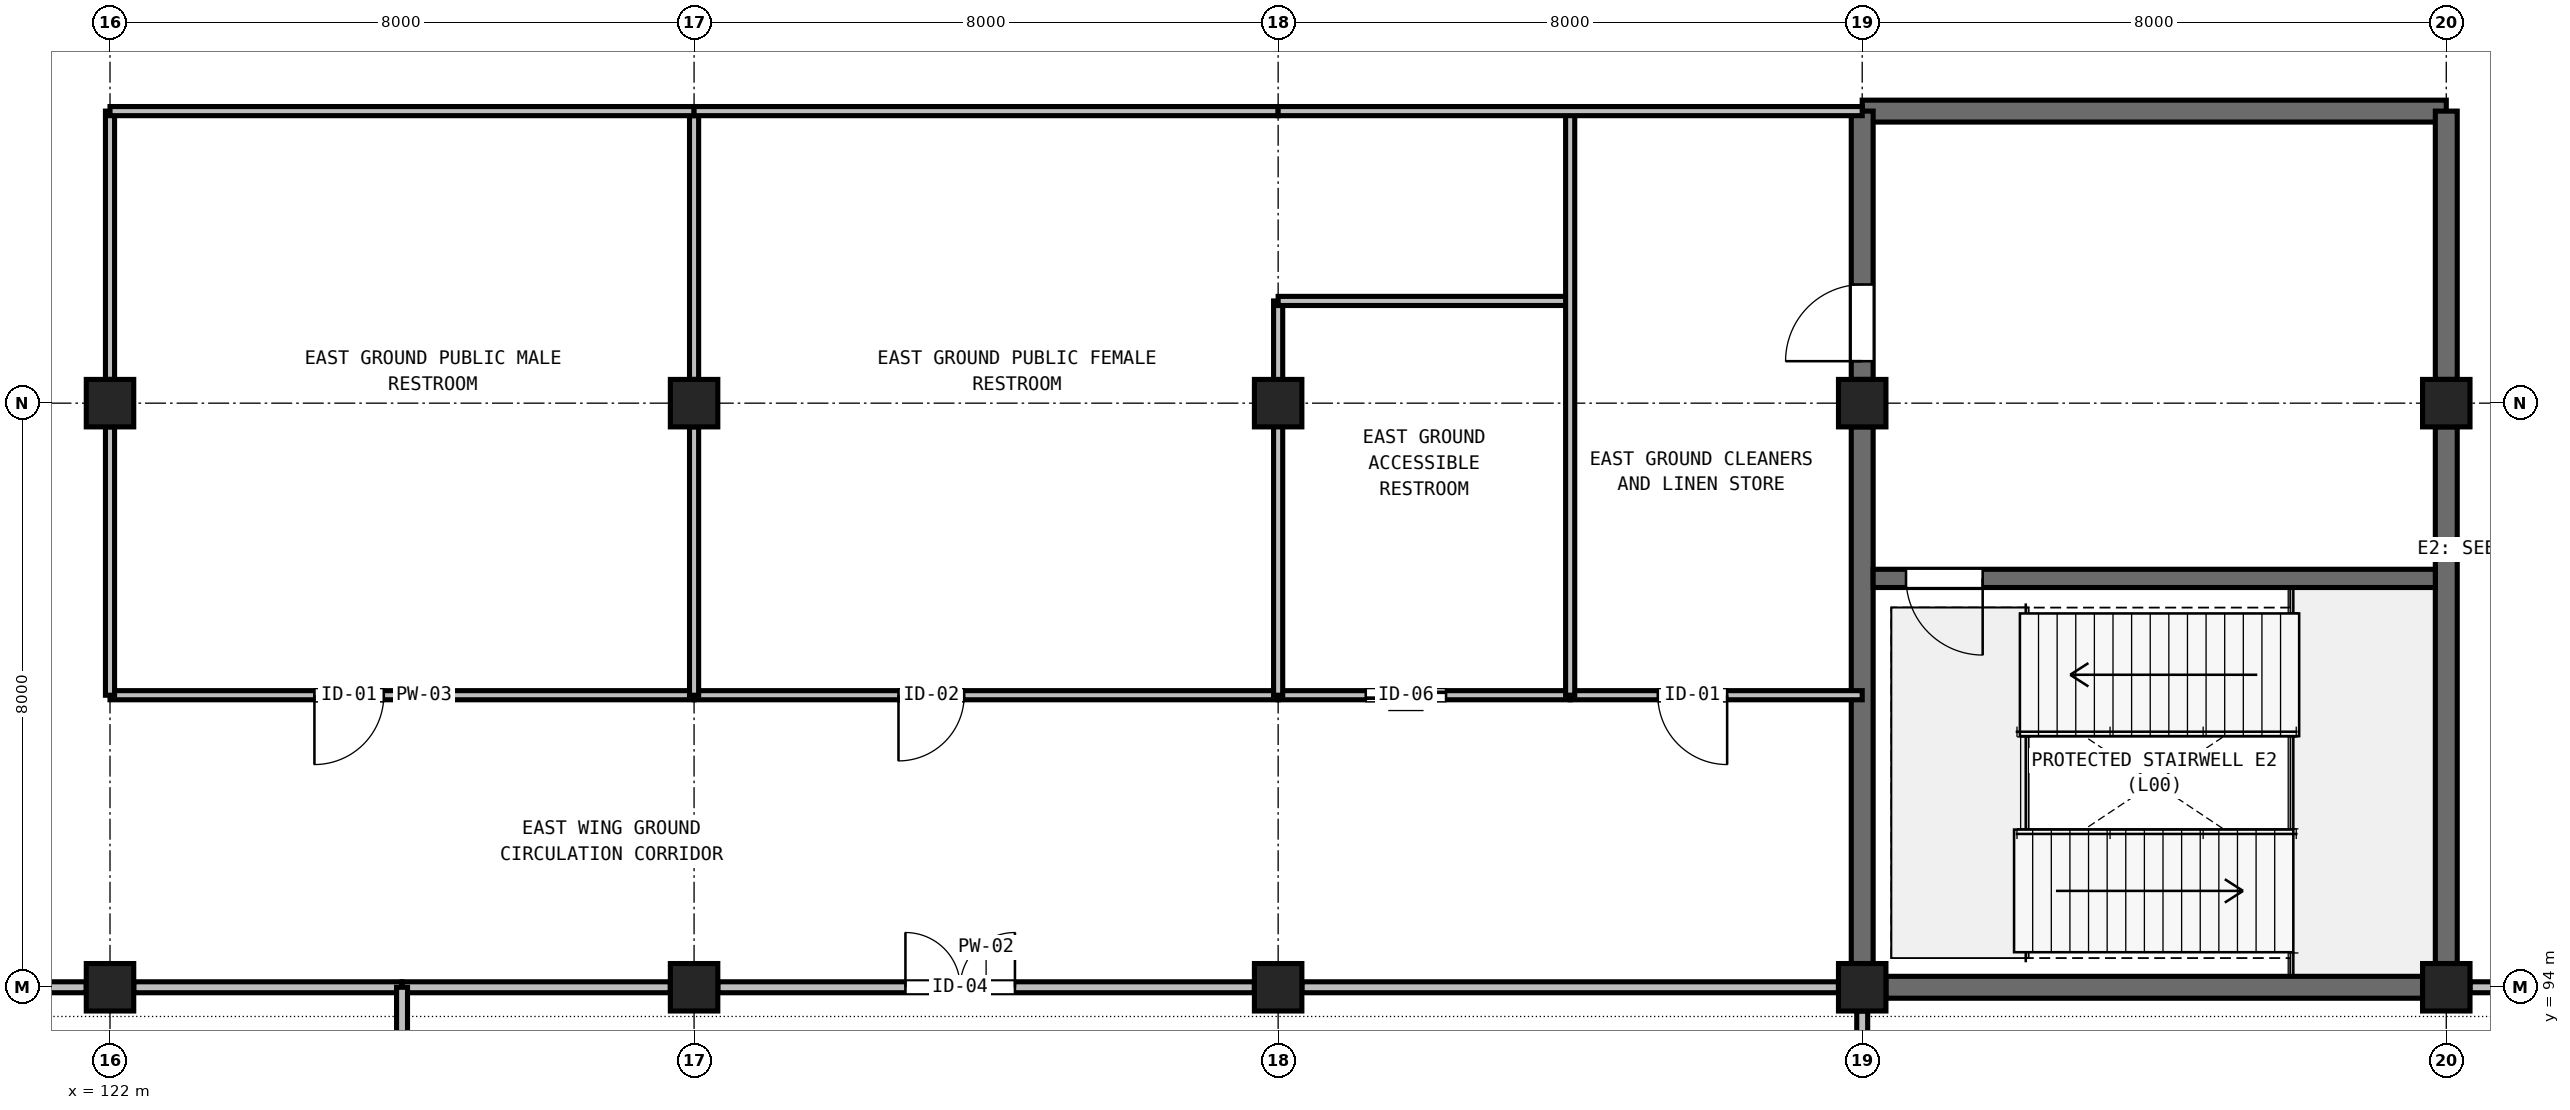
"""IFC4 building model, lengths in metres.
Left out: names, types, materials, properties, quantities, classifications, styles, units other than length and angle.
Written with IfcOpenShell. Run it as: python <this file> out.ifc"""

import sys

from ifc_helpers import new_model, si_unit, direction, frame, frame_2d, origin, origin_2d, place, context, subcontext, project, spatial, rectangle, circle, extrude, element, fill, save


model = new_model("IFC4")
c1 = context("Model", 3, precision=1e-05, world=origin(), true_north=direction((0.0, 1.0)))
c2 = subcontext(c1, "Body", "Model", "MODEL_VIEW")
j1 = project(units=[si_unit("LENGTHUNIT", "METRE"), si_unit("PLANEANGLEUNIT", "RADIAN")], contexts=[c1])
p1 = place(None, origin())
s1 = spatial("IfcSite", under=j1, at=p1, CompositionType="ELEMENT")
p2 = place(p1, origin())
s2 = spatial("IfcBuilding", under=s1, at=p2, CompositionType="ELEMENT")
p3 = place(p2, origin())
s3 = spatial("IfcBuildingStorey", under=s2, at=p3, CompositionType="ELEMENT", Elevation=0.0)
for number, where, z_axis, x_axis in (
    (1, (122.0, 94.0, 0.0), (0.0, 0.0, 1.0), (1.0, 0.0, 0.0)),
    (2, (122.0, 102.0, 0.0), (0.0, 0.0, 1.0), (1.0, 0.0, 0.0)),
    (3, (130.0, 94.0, 0.0), (0.0, 0.0, 1.0), (1.0, 0.0, 0.0)),
    (4, (130.0, 102.0, 0.0), (0.0, 0.0, 1.0), (1.0, 0.0, 0.0)),
    (5, (138.0, 94.0, 0.0), (0.0, 0.0, 1.0), (1.0, 0.0, 0.0)),
    (6, (138.0, 102.0, 0.0), (0.0, 0.0, 1.0), (1.0, 0.0, 0.0)),
    (7, (146.0, 94.0, 0.0), (0.0, 0.0, 1.0), (1.0, 0.0, 0.0)),
    (8, (146.0, 102.0, 0.0), (0.0, 0.0, 1.0), (1.0, 0.0, 0.0)),
    (9, (154.0, 94.0, 0.0), (0.0, 0.0, 1.0), (1.0, 0.0, 0.0)),
    (10, (154.0, 102.0, 0.0), (0.0, 0.0, 1.0), (1.0, 0.0, 0.0)),
):
    element("IfcColumn", number, at=place(p3, frame(where, z_axis=z_axis, x_axis=x_axis)), inside=s3, PredefinedType="COLUMN", context=c2, shape_type="SweptSolid", body=[
        extrude(circle(Radius=0.325, at=origin_2d()), origin(), (0.0, 0.0, 1.0), 5.4),
    ])
p4 = place(p3, frame((146.325, 94.0, 0.0), z_axis=(0.0, 0.0, 1.0), x_axis=(1.0, 0.0, 0.0)))
e11 = element("IfcWall", 11, at=p4, inside=s3, PredefinedType="SHEAR", context=c2, shape_type="SweptSolid", body=[
    extrude(rectangle(XDim=7.35, YDim=0.3, at=frame_2d((3.675, 0.0))), origin(), (0.0, 0.0, 1.0), 5.18),
])
p5 = place(p3, frame((146.0, 106.0, 0.0), z_axis=(0.0, 0.0, 1.0), x_axis=(1.0, 0.0, 0.0)))
e12 = element("IfcWall", 12, at=p5, inside=s3, PredefinedType="SHEAR", context=c2, shape_type="SweptSolid", body=[
    extrude(rectangle(XDim=8.0, YDim=0.3, at=frame_2d((4.0, 0.0))), origin(), (0.0, 0.0, 1.0), 5.18),
])
p6 = place(p3, frame((146.0, 94.325, 0.0), z_axis=(0.0, 0.0, 1.0), x_axis=(0.0, 1.0, 0.0)))
e13 = element("IfcWall", 13, at=p6, inside=s3, PredefinedType="SHEAR", context=c2, shape_type="SweptSolid", body=[
    extrude(rectangle(XDim=7.35, YDim=0.3, at=frame_2d((3.675, 0.0))), origin(), (0.0, 0.0, 1.0), 5.18),
])
p7 = place(p3, frame((146.0, 102.325, 0.0), z_axis=(0.0, 0.0, 1.0), x_axis=(0.0, 1.0, 0.0)))
e14 = element("IfcWall", 14, at=p7, inside=s3, PredefinedType="SHEAR", context=c2, shape_type="SweptSolid", body=[
    extrude(rectangle(XDim=3.675, YDim=0.3, at=frame_2d((1.837, 0.0))), origin(), (0.0, 0.0, 1.0), 5.18),
])
p8 = place(p7, frame((0.25, 0.0, 0.0)))
e15 = element("IfcOpeningElement", 15, at=p8, cuts=e14, PredefinedType="OPENING", context=c2, shape_type="SweptSolid", body=[
    extrude(rectangle(XDim=1.05, YDim=2.2, at=frame_2d((0.525, 1.1))), frame((0.0, 0.16, 0.0), z_axis=(0.0, -1.0, 0.0), x_axis=(1.0, 0.0, 0.0)), (0.0, 0.0, 1.0), 0.32),
])
p9 = place(p3, frame((154.0, 94.325, 0.0), z_axis=(0.0, 0.0, 1.0), x_axis=(0.0, 1.0, 0.0)))
e16 = element("IfcWall", 16, at=p9, inside=s3, PredefinedType="SHEAR", context=c2, shape_type="SweptSolid", body=[
    extrude(rectangle(XDim=7.35, YDim=0.3, at=frame_2d((3.675, 0.0))), origin(), (0.0, 0.0, 1.0), 5.18),
])
p10 = place(p3, frame((154.0, 102.325, 0.0), z_axis=(0.0, 0.0, 1.0), x_axis=(0.0, 1.0, 0.0)))
e17 = element("IfcWall", 17, at=p10, inside=s3, PredefinedType="SHEAR", context=c2, shape_type="SweptSolid", body=[
    extrude(rectangle(XDim=3.675, YDim=0.3, at=frame_2d((1.837, 0.0))), origin(), (0.0, 0.0, 1.0), 5.18),
])
p11 = place(p3, frame((146.15, 99.6, 0.0), z_axis=(0.0, 0.0, 1.0), x_axis=(1.0, 0.0, 0.0)))
e18 = element("IfcWall", 18, at=p11, inside=s3, PredefinedType="SOLIDWALL", context=c2, shape_type="SweptSolid", body=[
    extrude(rectangle(XDim=7.7, YDim=0.25, at=frame_2d((3.85, 0.0))), origin(), (0.0, 0.0, 1.0), 5.18),
])
p12 = place(p11, frame((0.45, 0.0, 0.0)))
e19 = element("IfcOpeningElement", 19, at=p12, cuts=e18, PredefinedType="OPENING", context=c2, shape_type="SweptSolid", body=[
    extrude(rectangle(XDim=1.05, YDim=2.2, at=frame_2d((0.525, 1.1))), frame((0.0, 0.135, 0.0), z_axis=(0.0, -1.0, 0.0), x_axis=(1.0, 0.0, 0.0)), (0.0, 0.0, 1.0), 0.27),
])
p13 = place(p3, frame((114.325, 94.0, 0.0), z_axis=(0.0, 0.0, 1.0), x_axis=(1.0, 0.0, 0.0)))
e20 = element("IfcWall", 20, at=p13, inside=s3, PredefinedType="PARTITIONING", context=c2, shape_type="SweptSolid", body=[
    extrude(rectangle(XDim=7.35, YDim=0.15, at=frame_2d((3.675, 0.0))), origin(), (0.0, 0.0, 1.0), 4.39),
])
p14 = place(p13, frame((2.57, 0.0, 0.0)))
e21 = element("IfcOpeningElement", 21, at=p14, cuts=e20, PredefinedType="OPENING", context=c2, shape_type="SweptSolid", body=[
    extrude(rectangle(XDim=1.5, YDim=2.2, at=frame_2d((0.75, 1.1))), frame((0.0, 0.085, 0.0), z_axis=(0.0, -1.0, 0.0), x_axis=(1.0, 0.0, 0.0)), (0.0, 0.0, 1.0), 0.17),
])
for number, where, z_axis, x_axis in (
    (22, (122.325, 94.0, 0.0), (0.0, 0.0, 1.0), (1.0, 0.0, 0.0)),
    (23, (126.0, 94.0, 0.0), (0.0, 0.0, 1.0), (1.0, 0.0, 0.0)),
):
    element("IfcWall", number, at=place(p3, frame(where, z_axis=z_axis, x_axis=x_axis)), inside=s3, PredefinedType="PARTITIONING", context=c2, shape_type="SweptSolid", body=[
        extrude(rectangle(XDim=3.675, YDim=0.15, at=frame_2d((1.837, 0.0))), origin(), (0.0, 0.0, 1.0), 4.24),
    ])
p15 = place(p3, frame((130.325, 94.0, 0.0), z_axis=(0.0, 0.0, 1.0), x_axis=(1.0, 0.0, 0.0)))
e24 = element("IfcWall", 24, at=p15, inside=s3, PredefinedType="PARTITIONING", context=c2, shape_type="SweptSolid", body=[
    extrude(rectangle(XDim=7.35, YDim=0.15, at=frame_2d((3.675, 0.0))), origin(), (0.0, 0.0, 1.0), 4.64),
])
p16 = place(p15, frame((2.57, 0.0, 0.0)))
e25 = element("IfcOpeningElement", 25, at=p16, cuts=e24, PredefinedType="OPENING", context=c2, shape_type="SweptSolid", body=[
    extrude(rectangle(XDim=1.5, YDim=2.2, at=frame_2d((0.75, 1.1))), frame((0.0, 0.085, 0.0), z_axis=(0.0, -1.0, 0.0), x_axis=(1.0, 0.0, 0.0)), (0.0, 0.0, 1.0), 0.17),
])
p17 = place(p3, frame((138.325, 94.0, 0.0), z_axis=(0.0, 0.0, 1.0), x_axis=(1.0, 0.0, 0.0)))
e26 = element("IfcWall", 26, at=p17, inside=s3, PredefinedType="PARTITIONING", context=c2, shape_type="SweptSolid", body=[
    extrude(rectangle(XDim=7.35, YDim=0.15, at=frame_2d((3.675, 0.0))), origin(), (0.0, 0.0, 1.0), 4.54),
])
p18 = place(p3, frame((154.325, 94.0, 0.0), z_axis=(0.0, 0.0, 1.0), x_axis=(1.0, 0.0, 0.0)))
e27 = element("IfcWall", 27, at=p18, inside=s3, PredefinedType="PARTITIONING", context=c2, shape_type="SweptSolid", body=[
    extrude(rectangle(XDim=7.35, YDim=0.15, at=frame_2d((3.675, 0.0))), origin(), (0.0, 0.0, 1.0), 4.34),
])
p19 = place(p3, frame((126.0, 86.0, 0.0), z_axis=(0.0, 0.0, 1.0), x_axis=(0.0, 1.0, 0.0)))
e28 = element("IfcWall", 28, at=p19, inside=s3, PredefinedType="PARTITIONING", context=c2, shape_type="SweptSolid", body=[
    extrude(rectangle(XDim=8.0, YDim=0.15, at=frame_2d((4.0, 0.0))), origin(), (0.0, 0.0, 1.0), 5.1),
])
p20 = place(p3, frame((146.0, 86.325, 0.0), z_axis=(0.0, 0.0, 1.0), x_axis=(0.0, 1.0, 0.0)))
e29 = element("IfcWall", 29, at=p20, inside=s3, PredefinedType="PARTITIONING", context=c2, shape_type="SweptSolid", body=[
    extrude(rectangle(XDim=7.35, YDim=0.15, at=frame_2d((3.675, 0.0))), origin(), (0.0, 0.0, 1.0), 4.29),
])
p21 = place(p20, frame((2.57, 0.0, 0.0)))
e30 = element("IfcOpeningElement", 30, at=p21, cuts=e29, PredefinedType="OPENING", context=c2, shape_type="SweptSolid", body=[
    extrude(rectangle(XDim=0.92, YDim=2.12, at=frame_2d((0.46, 1.06))), frame((0.0, 0.085, 0.0), z_axis=(0.0, -1.0, 0.0), x_axis=(1.0, 0.0, 0.0)), (0.0, 0.0, 1.0), 0.17),
])
p22 = place(p3, frame((122.0, 98.0, 0.0), z_axis=(0.0, 0.0, 1.0), x_axis=(1.0, 0.0, 0.0)))
e31 = element("IfcWall", 31, at=p22, inside=s3, PredefinedType="PARTITIONING", context=c2, shape_type="SweptSolid", body=[
    extrude(rectangle(XDim=8.0, YDim=0.125, at=frame_2d((4.0, 0.0))), origin(), (0.0, 0.0, 1.0), 5.1),
])
p23 = place(p22, frame((2.8, 0.0, 0.0)))
e32 = element("IfcOpeningElement", 32, at=p23, cuts=e31, PredefinedType="OPENING", context=c2, shape_type="SweptSolid", body=[
    extrude(rectangle(XDim=0.95, YDim=2.1, at=frame_2d((0.475, 1.05))), frame((0.0, 0.073, 0.0), z_axis=(0.0, -1.0, 0.0), x_axis=(1.0, 0.0, 0.0)), (0.0, 0.0, 1.0), 0.145),
])
p24 = place(p3, frame((130.0, 98.0, 0.0), z_axis=(0.0, 0.0, 1.0), x_axis=(1.0, 0.0, 0.0)))
e33 = element("IfcWall", 33, at=p24, inside=s3, PredefinedType="PARTITIONING", context=c2, shape_type="SweptSolid", body=[
    extrude(rectangle(XDim=8.0, YDim=0.125, at=frame_2d((4.0, 0.0))), origin(), (0.0, 0.0, 1.0), 5.1),
])
p25 = place(p24, frame((2.8, 0.0, 0.0)))
e34 = element("IfcOpeningElement", 34, at=p25, cuts=e33, PredefinedType="OPENING", context=c2, shape_type="SweptSolid", body=[
    extrude(rectangle(XDim=0.9, YDim=2.1, at=frame_2d((0.45, 1.05))), frame((0.0, 0.073, 0.0), z_axis=(0.0, -1.0, 0.0), x_axis=(1.0, 0.0, 0.0)), (0.0, 0.0, 1.0), 0.145),
])
p26 = place(p3, frame((138.0, 98.0, 0.0), z_axis=(0.0, 0.0, 1.0), x_axis=(1.0, 0.0, 0.0)))
e35 = element("IfcWall", 35, at=p26, inside=s3, PredefinedType="PARTITIONING", context=c2, shape_type="SweptSolid", body=[
    extrude(rectangle(XDim=4.0, YDim=0.125, at=frame_2d((2.0, 0.0))), origin(), (0.0, 0.0, 1.0), 5.1),
])
p27 = place(p26, frame((1.2, 0.0, 0.0)))
e36 = element("IfcOpeningElement", 36, at=p27, cuts=e35, PredefinedType="OPENING", context=c2, shape_type="SweptSolid", body=[
    extrude(rectangle(XDim=1.1, YDim=2.15, at=frame_2d((0.55, 1.075))), frame((0.0, 0.073, 0.0), z_axis=(0.0, -1.0, 0.0), x_axis=(1.0, 0.0, 0.0)), (0.0, 0.0, 1.0), 0.145),
])
p28 = place(p3, frame((142.0, 98.0, 0.0), z_axis=(0.0, 0.0, 1.0), x_axis=(1.0, 0.0, 0.0)))
e37 = element("IfcWall", 37, at=p28, inside=s3, PredefinedType="PARTITIONING", context=c2, shape_type="SweptSolid", body=[
    extrude(rectangle(XDim=4.0, YDim=0.125, at=frame_2d((2.0, 0.0))), origin(), (0.0, 0.0, 1.0), 5.1),
])
p29 = place(p28, frame((1.2, 0.0, 0.0)))
e38 = element("IfcOpeningElement", 38, at=p29, cuts=e37, PredefinedType="OPENING", context=c2, shape_type="SweptSolid", body=[
    extrude(rectangle(XDim=0.95, YDim=2.1, at=frame_2d((0.475, 1.05))), frame((0.0, 0.073, 0.0), z_axis=(0.0, -1.0, 0.0), x_axis=(1.0, 0.0, 0.0)), (0.0, 0.0, 1.0), 0.145),
])
p30 = place(p3, frame((122.0, 98.0, 0.0), z_axis=(0.0, 0.0, 1.0), x_axis=(0.0, 1.0, 0.0)))
e39 = element("IfcWall", 39, at=p30, inside=s3, PredefinedType="PARTITIONING", context=c2, shape_type="SweptSolid", body=[
    extrude(rectangle(XDim=3.675, YDim=0.125, at=frame_2d((1.837, 0.0))), origin(), (0.0, 0.0, 1.0), 4.49),
])
p31 = place(p3, frame((122.0, 102.325, 0.0), z_axis=(0.0, 0.0, 1.0), x_axis=(0.0, 1.0, 0.0)))
e40 = element("IfcWall", 40, at=p31, inside=s3, PredefinedType="PARTITIONING", context=c2, shape_type="SweptSolid", body=[
    extrude(rectangle(XDim=3.675, YDim=0.125, at=frame_2d((1.837, 0.0))), origin(), (0.0, 0.0, 1.0), 4.44),
])
p32 = place(p3, frame((130.0, 98.0, 0.0), z_axis=(0.0, 0.0, 1.0), x_axis=(0.0, 1.0, 0.0)))
e41 = element("IfcWall", 41, at=p32, inside=s3, PredefinedType="PARTITIONING", context=c2, shape_type="SweptSolid", body=[
    extrude(rectangle(XDim=3.675, YDim=0.125, at=frame_2d((1.837, 0.0))), origin(), (0.0, 0.0, 1.0), 4.34),
])
p33 = place(p3, frame((130.0, 102.325, 0.0), z_axis=(0.0, 0.0, 1.0), x_axis=(0.0, 1.0, 0.0)))
e42 = element("IfcWall", 42, at=p33, inside=s3, PredefinedType="PARTITIONING", context=c2, shape_type="SweptSolid", body=[
    extrude(rectangle(XDim=3.675, YDim=0.125, at=frame_2d((1.837, 0.0))), origin(), (0.0, 0.0, 1.0), 4.42),
])
p34 = place(p3, frame((138.0, 98.0, 0.0), z_axis=(0.0, 0.0, 1.0), x_axis=(0.0, 1.0, 0.0)))
e43 = element("IfcWall", 43, at=p34, inside=s3, PredefinedType="PARTITIONING", context=c2, shape_type="SweptSolid", body=[
    extrude(rectangle(XDim=5.4, YDim=0.125, at=frame_2d((2.7, 0.0))), origin(), (0.0, 0.0, 1.0), 4.39),
])
p35 = place(p3, frame((138.0, 103.4, 0.0), z_axis=(0.0, 0.0, 1.0), x_axis=(1.0, 0.0, 0.0)))
e44 = element("IfcWall", 44, at=p35, inside=s3, PredefinedType="PARTITIONING", context=c2, shape_type="SweptSolid", body=[
    extrude(rectangle(XDim=4.0, YDim=0.125, at=frame_2d((2.0, 0.0))), origin(), (0.0, 0.0, 1.0), 5.1),
])
for number, where, z_axis, x_axis in (
    (45, (142.0, 98.0, 0.0), (0.0, 0.0, 1.0), (0.0, 1.0, 0.0)),
    (46, (122.0, 106.0, 0.0), (0.0, 0.0, 1.0), (1.0, 0.0, 0.0)),
    (47, (130.0, 106.0, 0.0), (0.0, 0.0, 1.0), (1.0, 0.0, 0.0)),
    (48, (138.0, 106.0, 0.0), (0.0, 0.0, 1.0), (1.0, 0.0, 0.0)),
):
    element("IfcWall", number, at=place(p3, frame(where, z_axis=z_axis, x_axis=x_axis)), inside=s3, PredefinedType="PARTITIONING", context=c2, shape_type="SweptSolid", body=[
        extrude(rectangle(XDim=8.0, YDim=0.125, at=frame_2d((4.0, 0.0))), origin(), (0.0, 0.0, 1.0), 5.1),
    ])
p36 = place(p8, origin())
e49 = element("IfcDoor", 49, at=p36, inside=s3, OperationType="SINGLE_SWING_LEFT", PredefinedType="DOOR", context=c2, shape_type="SweptSolid", body=[
    extrude(rectangle(XDim=1.05, YDim=2.2, at=frame_2d((0.525, 1.1))), frame((0.0, 0.025, 0.0), z_axis=(0.0, -1.0, 0.0), x_axis=(1.0, 0.0, 0.0)), (0.0, 0.0, 1.0), 0.05),
])
fill(e15, e49)
p37 = place(p12, frame((1.05, 0.0, 0.0), z_axis=(0.0, 0.0, 1.0), x_axis=(-1.0, 0.0, 0.0)))
e50 = element("IfcDoor", 50, at=p37, inside=s3, OperationType="SINGLE_SWING_RIGHT", PredefinedType="DOOR", context=c2, shape_type="SweptSolid", body=[
    extrude(rectangle(XDim=1.05, YDim=2.2, at=frame_2d((0.525, 1.1))), frame((0.0, 0.025, 0.0), z_axis=(0.0, -1.0, 0.0), x_axis=(1.0, 0.0, 0.0)), (0.0, 0.0, 1.0), 0.05),
])
fill(e19, e50)
p38 = place(p16, origin())
e51 = element("IfcDoor", 51, at=p38, inside=s3, OperationType="DOUBLE_DOOR_SINGLE_SWING", PredefinedType="DOOR", context=c2, shape_type="SweptSolid", body=[
    extrude(rectangle(XDim=1.5, YDim=2.2, at=frame_2d((0.75, 1.1))), frame((0.0, 0.025, 0.0), z_axis=(0.0, -1.0, 0.0), x_axis=(1.0, 0.0, 0.0)), (0.0, 0.0, 1.0), 0.05),
])
fill(e25, e51)
p39 = place(p23, frame((0.95, 0.0, 0.0), z_axis=(0.0, 0.0, 1.0), x_axis=(-1.0, 0.0, 0.0)))
e52 = element("IfcDoor", 52, at=p39, inside=s3, OperationType="SINGLE_SWING_LEFT", PredefinedType="DOOR", context=c2, shape_type="SweptSolid", body=[
    extrude(rectangle(XDim=0.95, YDim=2.1, at=frame_2d((0.475, 1.05))), frame((0.0, 0.025, 0.0), z_axis=(0.0, -1.0, 0.0), x_axis=(1.0, 0.0, 0.0)), (0.0, 0.0, 1.0), 0.05),
])
fill(e32, e52)
p40 = place(p25, frame((0.9, 0.0, 0.0), z_axis=(0.0, 0.0, 1.0), x_axis=(-1.0, 0.0, 0.0)))
e53 = element("IfcDoor", 53, at=p40, inside=s3, OperationType="SINGLE_SWING_LEFT", PredefinedType="DOOR", context=c2, shape_type="SweptSolid", body=[
    extrude(rectangle(XDim=0.9, YDim=2.1, at=frame_2d((0.45, 1.05))), frame((0.0, 0.025, 0.0), z_axis=(0.0, -1.0, 0.0), x_axis=(1.0, 0.0, 0.0)), (0.0, 0.0, 1.0), 0.05),
])
fill(e34, e53)
p41 = place(p27, frame((1.1, 0.0, 0.0), z_axis=(0.0, 0.0, 1.0), x_axis=(-1.0, 0.0, 0.0)))
e54 = element("IfcDoor", 54, at=p41, inside=s3, OperationType="SLIDING_TO_RIGHT", PredefinedType="DOOR", context=c2, shape_type="SweptSolid", body=[
    extrude(rectangle(XDim=1.1, YDim=2.15, at=frame_2d((0.55, 1.075))), frame((0.0, 0.025, 0.0), z_axis=(0.0, -1.0, 0.0), x_axis=(1.0, 0.0, 0.0)), (0.0, 0.0, 1.0), 0.05),
])
fill(e36, e54)
p42 = place(p29, frame((0.95, 0.0, 0.0), z_axis=(0.0, 0.0, 1.0), x_axis=(-1.0, 0.0, 0.0)))
e55 = element("IfcDoor", 55, at=p42, inside=s3, OperationType="SINGLE_SWING_RIGHT", PredefinedType="DOOR", context=c2, shape_type="SweptSolid", body=[
    extrude(rectangle(XDim=0.95, YDim=2.1, at=frame_2d((0.475, 1.05))), frame((0.0, 0.025, 0.0), z_axis=(0.0, -1.0, 0.0), x_axis=(1.0, 0.0, 0.0)), (0.0, 0.0, 1.0), 0.05),
])
fill(e38, e55)
save(model, sys.argv[1])
